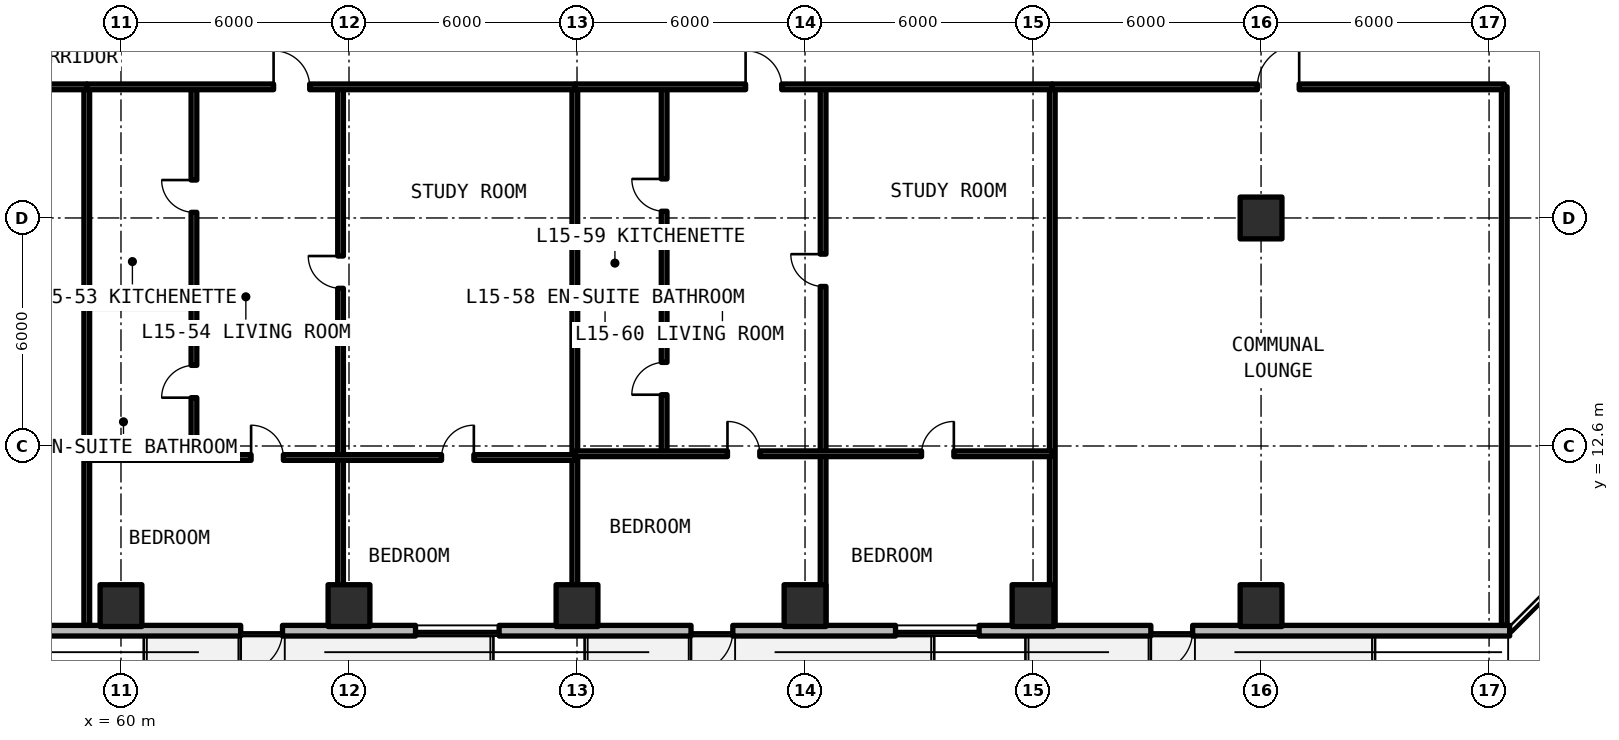
"""IFC4 building model, lengths in metres.
Left out: names, types, materials, properties, quantities, classifications, styles, units other than length and angle.
Written with IfcOpenShell. Run it as: python <this file> out.ifc"""

import sys

from ifc_helpers import new_model, si_unit, direction, frame, frame_2d, origin, origin_2d, place, context, subcontext, project, spatial, rectangle, extrude, element, fill, save


model = new_model("IFC4")
c1 = context("Model", 3, precision=1e-05, world=origin(), true_north=direction((0.0, 1.0)))
c2 = subcontext(c1, "Body", "Model", "MODEL_VIEW")
j1 = project(units=[si_unit("LENGTHUNIT", "METRE"), si_unit("PLANEANGLEUNIT", "RADIAN")], contexts=[c1])
p1 = place(None, origin())
s1 = spatial("IfcSite", under=j1, at=p1, CompositionType="ELEMENT")
p2 = place(p1, origin())
s2 = spatial("IfcBuilding", under=s1, at=p2, CompositionType="ELEMENT")
p3 = place(p2, frame((0.0, 0.0, 55.44)))
s3 = spatial("IfcBuildingStorey", under=s2, at=p3, CompositionType="ELEMENT", Elevation=55.44)
for number, where, z_axis, x_axis in (
    (1, (90.0, 18.6, 0.0), (0.0, 0.0, 1.0), (1.0, 0.0, 0.0)),
    (2, (60.0, 8.4, 0.0), (0.0, 0.0, 1.0), (1.0, 0.0, 0.0)),
    (3, (66.0, 8.4, 0.0), (0.0, 0.0, 1.0), (1.0, 0.0, 0.0)),
    (4, (72.0, 8.4, 0.0), (0.0, 0.0, 1.0), (1.0, 0.0, 0.0)),
    (5, (78.0, 8.4, 0.0), (0.0, 0.0, 1.0), (1.0, 0.0, 0.0)),
    (6, (84.0, 8.4, 0.0), (0.0, 0.0, 1.0), (1.0, 0.0, 0.0)),
    (7, (90.0, 8.4, 0.0), (0.0, 0.0, 1.0), (1.0, 0.0, 0.0)),
):
    element("IfcColumn", number, at=place(p3, frame(where, z_axis=z_axis, x_axis=x_axis)), inside=s3, PredefinedType="COLUMN", context=c2, shape_type="SweptSolid", body=[
        extrude(rectangle(XDim=1.1, YDim=1.1, at=origin_2d()), origin(), (0.0, 0.0, 1.0), 3.3),
    ])
p4 = place(p3, frame((52.14, 7.74, 0.0), z_axis=(0.0, 0.0, 1.0), x_axis=(1.0, 0.0, 0.0)))
e8 = element("IfcWall", 8, at=p4, inside=s3, PredefinedType="SOLIDWALL", context=c2, shape_type="SweptSolid", body=[
    extrude(rectangle(XDim=44.402, YDim=0.28, at=frame_2d((22.201, 0.0))), origin(), (0.0, 0.0, 1.0), 3.08),
])
p5 = place(p4, frame((11.01, 0.0, 0.0)))
e9 = element("IfcOpeningElement", 9, at=p5, cuts=e8, PredefinedType="OPENING", context=c2, shape_type="SweptSolid", body=[
    extrude(rectangle(XDim=1.1, YDim=2.15, at=frame_2d((0.55, 1.075))), frame((0.0, 0.15, 0.0), z_axis=(0.0, -1.0, 0.0), x_axis=(1.0, 0.0, 0.0)), (0.0, 0.0, 1.0), 0.3),
])
p6 = place(p4, frame((22.86, 0.0, 0.0)))
e10 = element("IfcOpeningElement", 10, at=p6, cuts=e8, PredefinedType="OPENING", context=c2, shape_type="SweptSolid", body=[
    extrude(rectangle(XDim=1.1, YDim=2.15, at=frame_2d((0.55, 1.075))), frame((0.0, 0.15, 0.0), z_axis=(0.0, -1.0, 0.0), x_axis=(1.0, 0.0, 0.0)), (0.0, 0.0, 1.0), 0.3),
])
p7 = place(p4, frame((34.96, 0.0, 0.0)))
e11 = element("IfcOpeningElement", 11, at=p7, cuts=e8, PredefinedType="OPENING", context=c2, shape_type="SweptSolid", body=[
    extrude(rectangle(XDim=1.1, YDim=2.15, at=frame_2d((0.55, 1.075))), frame((0.0, 0.15, 0.0), z_axis=(0.0, -1.0, 0.0), x_axis=(1.0, 0.0, 0.0)), (0.0, 0.0, 1.0), 0.3),
])
p8 = place(p4, frame((2.69, 0.0, 0.78)))
e12 = element("IfcOpeningElement", 12, at=p8, cuts=e8, PredefinedType="OPENING", context=c2, shape_type="SweptSolid", body=[
    extrude(rectangle(XDim=2.2, YDim=1.66, at=frame_2d((1.1, 0.83))), frame((0.0, 0.15, 0.0), z_axis=(0.0, -1.0, 0.0), x_axis=(1.0, 0.0, 0.0)), (0.0, 0.0, 1.0), 0.3),
])
p9 = place(p4, frame((15.61, 0.0, 0.78)))
e13 = element("IfcOpeningElement", 13, at=p9, cuts=e8, PredefinedType="OPENING", context=c2, shape_type="SweptSolid", body=[
    extrude(rectangle(XDim=2.2, YDim=1.66, at=frame_2d((1.1, 0.83))), frame((0.0, 0.15, 0.0), z_axis=(0.0, -1.0, 0.0), x_axis=(1.0, 0.0, 0.0)), (0.0, 0.0, 1.0), 0.3),
])
p10 = place(p4, frame((28.241, 0.0, 0.78)))
e14 = element("IfcOpeningElement", 14, at=p10, cuts=e8, PredefinedType="OPENING", context=c2, shape_type="SweptSolid", body=[
    extrude(rectangle(XDim=2.2, YDim=1.66, at=frame_2d((1.1, 0.83))), frame((0.0, 0.15, 0.0), z_axis=(0.0, -1.0, 0.0), x_axis=(1.0, 0.0, 0.0)), (0.0, 0.0, 1.0), 0.3),
])
for number, where, z_axis, x_axis in (
    (15, (96.4, 7.88, 0.0), (0.0, 0.0, 1.0), (0.0, 1.0, 0.0)),
    (16, (59.1, 7.88, 0.0), (0.0, 0.0, 1.0), (0.0, 1.0, 0.0)),
):
    element("IfcWall", number, at=place(p3, frame(where, z_axis=z_axis, x_axis=x_axis)), inside=s3, PredefinedType="SOLIDWALL", context=c2, shape_type="SweptSolid", body=[
        extrude(rectangle(XDim=14.17, YDim=0.15, at=frame_2d((7.085, 0.0))), origin(), (0.0, 0.0, 1.0), 2.35),
    ])
p11 = place(p3, frame((52.12, 22.05, 0.0), z_axis=(0.0, 0.0, 1.0), x_axis=(1.0, 0.0, 0.0)))
e17 = element("IfcWall", 17, at=p11, inside=s3, PredefinedType="SOLIDWALL", context=c2, shape_type="SweptSolid", body=[
    extrude(rectangle(XDim=6.98, YDim=0.15, at=frame_2d((3.49, 0.0))), origin(), (0.0, 0.0, 1.0), 2.35),
])
p12 = place(p11, frame((3.015, 0.0, 0.0)))
e18 = element("IfcOpeningElement", 18, at=p12, cuts=e17, PredefinedType="OPENING", context=c2, shape_type="SweptSolid", body=[
    extrude(rectangle(XDim=0.95, YDim=2.15, at=frame_2d((0.475, 1.075))), frame((0.0, 0.085, 0.0), z_axis=(0.0, -1.0, 0.0), x_axis=(1.0, 0.0, 0.0)), (0.0, 0.0, 1.0), 0.17),
])
p13 = place(p3, frame((71.943, 7.88, 0.0), z_axis=(0.0, 0.0, 1.0), x_axis=(0.0, 1.0, 0.0)))
e19 = element("IfcWall", 19, at=p13, inside=s3, PredefinedType="SOLIDWALL", context=c2, shape_type="SweptSolid", body=[
    extrude(rectangle(XDim=14.17, YDim=0.15, at=frame_2d((7.085, 0.0))), origin(), (0.0, 0.0, 1.0), 2.35),
])
p14 = place(p3, frame((65.778, 12.297, 0.0), z_axis=(0.0, 0.0, 1.0), x_axis=(0.0, 1.0, 0.0)))
e20 = element("IfcWall", 20, at=p14, inside=s3, PredefinedType="PARTITIONING", context=c2, shape_type="SweptSolid", body=[
    extrude(rectangle(XDim=9.753, YDim=0.15, at=frame_2d((4.876, 0.0))), origin(), (0.0, 0.0, 1.0), 2.35),
])
p15 = place(p14, frame((4.451, 0.0, 0.0)))
e21 = element("IfcOpeningElement", 21, at=p15, cuts=e20, PredefinedType="OPENING", context=c2, shape_type="SweptSolid", body=[
    extrude(rectangle(XDim=0.85, YDim=2.1, at=frame_2d((0.425, 1.05))), frame((0.0, 0.085, 0.0), z_axis=(0.0, -1.0, 0.0), x_axis=(1.0, 0.0, 0.0)), (0.0, 0.0, 1.0), 0.17),
])
p16 = place(p3, frame((59.1, 16.296, 0.0), z_axis=(0.0, 0.0, 1.0), x_axis=(1.0, 0.0, 0.0)))
e22 = element("IfcWall", 22, at=p16, inside=s3, PredefinedType="PARTITIONING", context=c2, shape_type="SweptSolid", body=[
    extrude(rectangle(XDim=2.82, YDim=0.15, at=frame_2d((1.41, 0.0))), origin(), (0.0, 0.0, 1.0), 2.35),
])
p17 = place(p3, frame((61.92, 12.297, 0.0), z_axis=(0.0, 0.0, 1.0), x_axis=(0.0, 1.0, 0.0)))
e23 = element("IfcWall", 23, at=p17, inside=s3, PredefinedType="PARTITIONING", context=c2, shape_type="SweptSolid", body=[
    extrude(rectangle(XDim=9.753, YDim=0.15, at=frame_2d((4.876, 0.0))), origin(), (0.0, 0.0, 1.0), 2.35),
])
p18 = place(p17, frame((1.574, 0.0, 0.0)))
e24 = element("IfcOpeningElement", 24, at=p18, cuts=e23, PredefinedType="OPENING", context=c2, shape_type="SweptSolid", body=[
    extrude(rectangle(XDim=0.85, YDim=2.1, at=frame_2d((0.425, 1.05))), frame((0.0, 0.085, 0.0), z_axis=(0.0, -1.0, 0.0), x_axis=(1.0, 0.0, 0.0)), (0.0, 0.0, 1.0), 0.17),
])
p19 = place(p17, frame((6.451, 0.0, 0.0)))
e25 = element("IfcOpeningElement", 25, at=p19, cuts=e23, PredefinedType="OPENING", context=c2, shape_type="SweptSolid", body=[
    extrude(rectangle(XDim=0.85, YDim=2.1, at=frame_2d((0.425, 1.05))), frame((0.0, 0.085, 0.0), z_axis=(0.0, -1.0, 0.0), x_axis=(1.0, 0.0, 0.0)), (0.0, 0.0, 1.0), 0.17),
])
p20 = place(p3, frame((65.778, 7.88, 0.0), z_axis=(0.0, 0.0, 1.0), x_axis=(0.0, 1.0, 0.0)))
e26 = element("IfcWall", 26, at=p20, inside=s3, PredefinedType="PARTITIONING", context=c2, shape_type="SweptSolid", body=[
    extrude(rectangle(XDim=4.417, YDim=0.15, at=frame_2d((2.209, 0.0))), origin(), (0.0, 0.0, 1.0), 2.35),
])
p21 = place(p3, frame((59.1, 12.297, 0.0), z_axis=(0.0, 0.0, 1.0), x_axis=(1.0, 0.0, 0.0)))
e27 = element("IfcWall", 27, at=p21, inside=s3, PredefinedType="PARTITIONING", context=c2, shape_type="SweptSolid", body=[
    extrude(rectangle(XDim=12.843, YDim=0.15, at=frame_2d((6.421, 0.0))), origin(), (0.0, 0.0, 1.0), 2.35),
])
p22 = place(p21, frame((4.324, 0.0, 0.0)))
e28 = element("IfcOpeningElement", 28, at=p22, cuts=e27, PredefinedType="OPENING", context=c2, shape_type="SweptSolid", body=[
    extrude(rectangle(XDim=0.85, YDim=2.1, at=frame_2d((0.425, 1.05))), frame((0.0, 0.085, 0.0), z_axis=(0.0, -1.0, 0.0), x_axis=(1.0, 0.0, 0.0)), (0.0, 0.0, 1.0), 0.17),
])
p23 = place(p21, frame((9.336, 0.0, 0.0)))
e29 = element("IfcOpeningElement", 29, at=p23, cuts=e27, PredefinedType="OPENING", context=c2, shape_type="SweptSolid", body=[
    extrude(rectangle(XDim=0.85, YDim=2.1, at=frame_2d((0.425, 1.05))), frame((0.0, 0.085, 0.0), z_axis=(0.0, -1.0, 0.0), x_axis=(1.0, 0.0, 0.0)), (0.0, 0.0, 1.0), 0.17),
])
p24 = place(p3, frame((59.1, 22.05, 0.0), z_axis=(0.0, 0.0, 1.0), x_axis=(1.0, 0.0, 0.0)))
e30 = element("IfcWall", 30, at=p24, inside=s3, PredefinedType="SOLIDWALL", context=c2, shape_type="SweptSolid", body=[
    extrude(rectangle(XDim=12.843, YDim=0.15, at=frame_2d((6.421, 0.0))), origin(), (0.0, 0.0, 1.0), 2.35),
])
p25 = place(p24, frame((4.916, 0.0, 0.0)))
e31 = element("IfcOpeningElement", 31, at=p25, cuts=e30, PredefinedType="OPENING", context=c2, shape_type="SweptSolid", body=[
    extrude(rectangle(XDim=0.95, YDim=2.15, at=frame_2d((0.475, 1.075))), frame((0.0, 0.085, 0.0), z_axis=(0.0, -1.0, 0.0), x_axis=(1.0, 0.0, 0.0)), (0.0, 0.0, 1.0), 0.17),
])
p26 = place(p3, frame((84.506, 7.88, 0.0), z_axis=(0.0, 0.0, 1.0), x_axis=(0.0, 1.0, 0.0)))
e32 = element("IfcWall", 32, at=p26, inside=s3, PredefinedType="SOLIDWALL", context=c2, shape_type="SweptSolid", body=[
    extrude(rectangle(XDim=14.17, YDim=0.15, at=frame_2d((7.085, 0.0))), origin(), (0.0, 0.0, 1.0), 2.35),
])
p27 = place(p3, frame((78.476, 12.396, 0.0), z_axis=(0.0, 0.0, 1.0), x_axis=(0.0, 1.0, 0.0)))
e33 = element("IfcWall", 33, at=p27, inside=s3, PredefinedType="PARTITIONING", context=c2, shape_type="SweptSolid", body=[
    extrude(rectangle(XDim=9.655, YDim=0.15, at=frame_2d((4.827, 0.0))), origin(), (0.0, 0.0, 1.0), 2.35),
])
p28 = place(p27, frame((4.402, 0.0, 0.0)))
e34 = element("IfcOpeningElement", 34, at=p28, cuts=e33, PredefinedType="OPENING", context=c2, shape_type="SweptSolid", body=[
    extrude(rectangle(XDim=0.85, YDim=2.1, at=frame_2d((0.425, 1.05))), frame((0.0, 0.085, 0.0), z_axis=(0.0, -1.0, 0.0), x_axis=(1.0, 0.0, 0.0)), (0.0, 0.0, 1.0), 0.17),
])
p29 = place(p3, frame((71.943, 16.354, 0.0), z_axis=(0.0, 0.0, 1.0), x_axis=(1.0, 0.0, 0.0)))
e35 = element("IfcWall", 35, at=p29, inside=s3, PredefinedType="PARTITIONING", context=c2, shape_type="SweptSolid", body=[
    extrude(rectangle(XDim=2.35, YDim=0.15, at=frame_2d((1.175, 0.0))), origin(), (0.0, 0.0, 1.0), 2.35),
])
p30 = place(p3, frame((74.293, 12.396, 0.0), z_axis=(0.0, 0.0, 1.0), x_axis=(0.0, 1.0, 0.0)))
e36 = element("IfcWall", 36, at=p30, inside=s3, PredefinedType="PARTITIONING", context=c2, shape_type="SweptSolid", body=[
    extrude(rectangle(XDim=9.655, YDim=0.15, at=frame_2d((4.827, 0.0))), origin(), (0.0, 0.0, 1.0), 2.35),
])
p31 = place(p30, frame((1.554, 0.0, 0.0)))
e37 = element("IfcOpeningElement", 37, at=p31, cuts=e36, PredefinedType="OPENING", context=c2, shape_type="SweptSolid", body=[
    extrude(rectangle(XDim=0.85, YDim=2.1, at=frame_2d((0.425, 1.05))), frame((0.0, 0.085, 0.0), z_axis=(0.0, -1.0, 0.0), x_axis=(1.0, 0.0, 0.0)), (0.0, 0.0, 1.0), 0.17),
])
p32 = place(p30, frame((6.381, 0.0, 0.0)))
e38 = element("IfcOpeningElement", 38, at=p32, cuts=e36, PredefinedType="OPENING", context=c2, shape_type="SweptSolid", body=[
    extrude(rectangle(XDim=0.85, YDim=2.1, at=frame_2d((0.425, 1.05))), frame((0.0, 0.085, 0.0), z_axis=(0.0, -1.0, 0.0), x_axis=(1.0, 0.0, 0.0)), (0.0, 0.0, 1.0), 0.17),
])
p33 = place(p3, frame((78.476, 7.88, 0.0), z_axis=(0.0, 0.0, 1.0), x_axis=(0.0, 1.0, 0.0)))
e39 = element("IfcWall", 39, at=p33, inside=s3, PredefinedType="PARTITIONING", context=c2, shape_type="SweptSolid", body=[
    extrude(rectangle(XDim=4.516, YDim=0.15, at=frame_2d((2.258, 0.0))), origin(), (0.0, 0.0, 1.0), 2.35),
])
p34 = place(p3, frame((71.943, 12.396, 0.0), z_axis=(0.0, 0.0, 1.0), x_axis=(1.0, 0.0, 0.0)))
e40 = element("IfcWall", 40, at=p34, inside=s3, PredefinedType="PARTITIONING", context=c2, shape_type="SweptSolid", body=[
    extrude(rectangle(XDim=12.564, YDim=0.15, at=frame_2d((6.282, 0.0))), origin(), (0.0, 0.0, 1.0), 2.35),
])
p35 = place(p34, frame((4.017, 0.0, 0.0)))
e41 = element("IfcOpeningElement", 41, at=p35, cuts=e40, PredefinedType="OPENING", context=c2, shape_type="SweptSolid", body=[
    extrude(rectangle(XDim=0.85, YDim=2.1, at=frame_2d((0.425, 1.05))), frame((0.0, 0.085, 0.0), z_axis=(0.0, -1.0, 0.0), x_axis=(1.0, 0.0, 0.0)), (0.0, 0.0, 1.0), 0.17),
])
p36 = place(p34, frame((9.123, 0.0, 0.0)))
e42 = element("IfcOpeningElement", 42, at=p36, cuts=e40, PredefinedType="OPENING", context=c2, shape_type="SweptSolid", body=[
    extrude(rectangle(XDim=0.85, YDim=2.1, at=frame_2d((0.425, 1.05))), frame((0.0, 0.085, 0.0), z_axis=(0.0, -1.0, 0.0), x_axis=(1.0, 0.0, 0.0)), (0.0, 0.0, 1.0), 0.17),
])
p37 = place(p3, frame((71.943, 22.05, 0.0), z_axis=(0.0, 0.0, 1.0), x_axis=(1.0, 0.0, 0.0)))
e43 = element("IfcWall", 43, at=p37, inside=s3, PredefinedType="SOLIDWALL", context=c2, shape_type="SweptSolid", body=[
    extrude(rectangle(XDim=12.564, YDim=0.15, at=frame_2d((6.282, 0.0))), origin(), (0.0, 0.0, 1.0), 2.35),
])
p38 = place(p37, frame((4.493, 0.0, 0.0)))
e44 = element("IfcOpeningElement", 44, at=p38, cuts=e43, PredefinedType="OPENING", context=c2, shape_type="SweptSolid", body=[
    extrude(rectangle(XDim=0.95, YDim=2.15, at=frame_2d((0.475, 1.075))), frame((0.0, 0.085, 0.0), z_axis=(0.0, -1.0, 0.0), x_axis=(1.0, 0.0, 0.0)), (0.0, 0.0, 1.0), 0.17),
])
p39 = place(p3, frame((84.506, 22.05, 0.0), z_axis=(0.0, 0.0, 1.0), x_axis=(1.0, 0.0, 0.0)))
e45 = element("IfcWall", 45, at=p39, inside=s3, PredefinedType="SOLIDWALL", context=c2, shape_type="SweptSolid", body=[
    extrude(rectangle(XDim=11.894, YDim=0.15, at=frame_2d((5.947, 0.0))), origin(), (0.0, 0.0, 1.0), 2.35),
])
p40 = place(p39, frame((5.397, 0.0, 0.0)))
e46 = element("IfcOpeningElement", 46, at=p40, cuts=e45, PredefinedType="OPENING", context=c2, shape_type="SweptSolid", body=[
    extrude(rectangle(XDim=1.1, YDim=2.15, at=frame_2d((0.55, 1.075))), frame((0.0, 0.085, 0.0), z_axis=(0.0, -1.0, 0.0), x_axis=(1.0, 0.0, 0.0)), (0.0, 0.0, 1.0), 0.17),
])
p41 = place(p5, frame((1.1, 0.0, 0.0), z_axis=(0.0, 0.0, 1.0), x_axis=(-1.0, 0.0, 0.0)))
e47 = element("IfcDoor", 47, at=p41, inside=s3, OperationType="SINGLE_SWING_LEFT", PredefinedType="DOOR", context=c2, shape_type="SweptSolid", body=[
    extrude(rectangle(XDim=1.1, YDim=2.15, at=frame_2d((0.55, 1.075))), frame((0.0, 0.025, 0.0), z_axis=(0.0, -1.0, 0.0), x_axis=(1.0, 0.0, 0.0)), (0.0, 0.0, 1.0), 0.05),
])
fill(e9, e47)
p42 = place(p6, frame((1.1, 0.0, 0.0), z_axis=(0.0, 0.0, 1.0), x_axis=(-1.0, 0.0, 0.0)))
e48 = element("IfcDoor", 48, at=p42, inside=s3, OperationType="SINGLE_SWING_RIGHT", PredefinedType="DOOR", context=c2, shape_type="SweptSolid", body=[
    extrude(rectangle(XDim=1.1, YDim=2.15, at=frame_2d((0.55, 1.075))), frame((0.0, 0.025, 0.0), z_axis=(0.0, -1.0, 0.0), x_axis=(1.0, 0.0, 0.0)), (0.0, 0.0, 1.0), 0.05),
])
fill(e10, e48)
p43 = place(p7, frame((1.1, 0.0, 0.0), z_axis=(0.0, 0.0, 1.0), x_axis=(-1.0, 0.0, 0.0)))
e49 = element("IfcDoor", 49, at=p43, inside=s3, OperationType="SINGLE_SWING_LEFT", PredefinedType="DOOR", context=c2, shape_type="SweptSolid", body=[
    extrude(rectangle(XDim=1.1, YDim=2.15, at=frame_2d((0.55, 1.075))), frame((0.0, 0.025, 0.0), z_axis=(0.0, -1.0, 0.0), x_axis=(1.0, 0.0, 0.0)), (0.0, 0.0, 1.0), 0.05),
])
fill(e11, e49)
p44 = place(p9, origin())
e50 = element("IfcWindow", 50, at=p44, inside=s3, PartitioningType="SINGLE_PANEL", PredefinedType="WINDOW", context=c2, shape_type="SweptSolid", body=[
    extrude(rectangle(XDim=2.2, YDim=1.66, at=frame_2d((1.1, 0.83))), frame((0.0, 0.03, 0.0), z_axis=(0.0, -1.0, 0.0), x_axis=(1.0, 0.0, 0.0)), (0.0, 0.0, 1.0), 0.06),
])
fill(e13, e50)
p45 = place(p10, origin())
e51 = element("IfcWindow", 51, at=p45, inside=s3, PartitioningType="SINGLE_PANEL", PredefinedType="WINDOW", context=c2, shape_type="SweptSolid", body=[
    extrude(rectangle(XDim=2.2, YDim=1.66, at=frame_2d((1.1, 0.83))), frame((0.0, 0.03, 0.0), z_axis=(0.0, -1.0, 0.0), x_axis=(1.0, 0.0, 0.0)), (0.0, 0.0, 1.0), 0.06),
])
fill(e14, e51)
p46 = place(p15, origin())
e52 = element("IfcDoor", 52, at=p46, inside=s3, OperationType="SINGLE_SWING_RIGHT", PredefinedType="DOOR", context=c2, shape_type="SweptSolid", body=[
    extrude(rectangle(XDim=0.85, YDim=2.1, at=frame_2d((0.425, 1.05))), frame((0.0, 0.025, 0.0), z_axis=(0.0, -1.0, 0.0), x_axis=(1.0, 0.0, 0.0)), (0.0, 0.0, 1.0), 0.05),
])
fill(e21, e52)
p47 = place(p18, origin())
e53 = element("IfcDoor", 53, at=p47, inside=s3, OperationType="SINGLE_SWING_LEFT", PredefinedType="DOOR", context=c2, shape_type="SweptSolid", body=[
    extrude(rectangle(XDim=0.85, YDim=2.1, at=frame_2d((0.425, 1.05))), frame((0.0, 0.025, 0.0), z_axis=(0.0, -1.0, 0.0), x_axis=(1.0, 0.0, 0.0)), (0.0, 0.0, 1.0), 0.05),
])
fill(e24, e53)
p48 = place(p19, origin())
e54 = element("IfcDoor", 54, at=p48, inside=s3, OperationType="SINGLE_SWING_RIGHT", PredefinedType="DOOR", context=c2, shape_type="SweptSolid", body=[
    extrude(rectangle(XDim=0.85, YDim=2.1, at=frame_2d((0.425, 1.05))), frame((0.0, 0.025, 0.0), z_axis=(0.0, -1.0, 0.0), x_axis=(1.0, 0.0, 0.0)), (0.0, 0.0, 1.0), 0.05),
])
fill(e25, e54)
p49 = place(p22, origin())
e55 = element("IfcDoor", 55, at=p49, inside=s3, OperationType="SINGLE_SWING_LEFT", PredefinedType="DOOR", context=c2, shape_type="SweptSolid", body=[
    extrude(rectangle(XDim=0.85, YDim=2.1, at=frame_2d((0.425, 1.05))), frame((0.0, 0.025, 0.0), z_axis=(0.0, -1.0, 0.0), x_axis=(1.0, 0.0, 0.0)), (0.0, 0.0, 1.0), 0.05),
])
fill(e28, e55)
p50 = place(p23, origin())
e56 = element("IfcDoor", 56, at=p50, inside=s3, OperationType="SINGLE_SWING_RIGHT", PredefinedType="DOOR", context=c2, shape_type="SweptSolid", body=[
    extrude(rectangle(XDim=0.85, YDim=2.1, at=frame_2d((0.425, 1.05))), frame((0.0, 0.025, 0.0), z_axis=(0.0, -1.0, 0.0), x_axis=(1.0, 0.0, 0.0)), (0.0, 0.0, 1.0), 0.05),
])
fill(e29, e56)
p51 = place(p25, origin())
e57 = element("IfcDoor", 57, at=p51, inside=s3, OperationType="SINGLE_SWING_LEFT", PredefinedType="DOOR", context=c2, shape_type="SweptSolid", body=[
    extrude(rectangle(XDim=0.95, YDim=2.15, at=frame_2d((0.475, 1.075))), frame((0.0, 0.025, 0.0), z_axis=(0.0, -1.0, 0.0), x_axis=(1.0, 0.0, 0.0)), (0.0, 0.0, 1.0), 0.05),
])
fill(e31, e57)
p52 = place(p28, origin())
e58 = element("IfcDoor", 58, at=p52, inside=s3, OperationType="SINGLE_SWING_RIGHT", PredefinedType="DOOR", context=c2, shape_type="SweptSolid", body=[
    extrude(rectangle(XDim=0.85, YDim=2.1, at=frame_2d((0.425, 1.05))), frame((0.0, 0.025, 0.0), z_axis=(0.0, -1.0, 0.0), x_axis=(1.0, 0.0, 0.0)), (0.0, 0.0, 1.0), 0.05),
])
fill(e34, e58)
p53 = place(p31, origin())
e59 = element("IfcDoor", 59, at=p53, inside=s3, OperationType="SINGLE_SWING_LEFT", PredefinedType="DOOR", context=c2, shape_type="SweptSolid", body=[
    extrude(rectangle(XDim=0.85, YDim=2.1, at=frame_2d((0.425, 1.05))), frame((0.0, 0.025, 0.0), z_axis=(0.0, -1.0, 0.0), x_axis=(1.0, 0.0, 0.0)), (0.0, 0.0, 1.0), 0.05),
])
fill(e37, e59)
p54 = place(p32, origin())
e60 = element("IfcDoor", 60, at=p54, inside=s3, OperationType="SINGLE_SWING_RIGHT", PredefinedType="DOOR", context=c2, shape_type="SweptSolid", body=[
    extrude(rectangle(XDim=0.85, YDim=2.1, at=frame_2d((0.425, 1.05))), frame((0.0, 0.025, 0.0), z_axis=(0.0, -1.0, 0.0), x_axis=(1.0, 0.0, 0.0)), (0.0, 0.0, 1.0), 0.05),
])
fill(e38, e60)
p55 = place(p35, origin())
e61 = element("IfcDoor", 61, at=p55, inside=s3, OperationType="SINGLE_SWING_LEFT", PredefinedType="DOOR", context=c2, shape_type="SweptSolid", body=[
    extrude(rectangle(XDim=0.85, YDim=2.1, at=frame_2d((0.425, 1.05))), frame((0.0, 0.025, 0.0), z_axis=(0.0, -1.0, 0.0), x_axis=(1.0, 0.0, 0.0)), (0.0, 0.0, 1.0), 0.05),
])
fill(e41, e61)
p56 = place(p36, origin())
e62 = element("IfcDoor", 62, at=p56, inside=s3, OperationType="SINGLE_SWING_RIGHT", PredefinedType="DOOR", context=c2, shape_type="SweptSolid", body=[
    extrude(rectangle(XDim=0.85, YDim=2.1, at=frame_2d((0.425, 1.05))), frame((0.0, 0.025, 0.0), z_axis=(0.0, -1.0, 0.0), x_axis=(1.0, 0.0, 0.0)), (0.0, 0.0, 1.0), 0.05),
])
fill(e42, e62)
p57 = place(p38, origin())
e63 = element("IfcDoor", 63, at=p57, inside=s3, OperationType="SINGLE_SWING_LEFT", PredefinedType="DOOR", context=c2, shape_type="SweptSolid", body=[
    extrude(rectangle(XDim=0.95, YDim=2.15, at=frame_2d((0.475, 1.075))), frame((0.0, 0.025, 0.0), z_axis=(0.0, -1.0, 0.0), x_axis=(1.0, 0.0, 0.0)), (0.0, 0.0, 1.0), 0.05),
])
fill(e44, e63)
p58 = place(p40, origin())
e64 = element("IfcDoor", 64, at=p58, inside=s3, OperationType="SINGLE_SWING_RIGHT", PredefinedType="DOOR", context=c2, shape_type="SweptSolid", body=[
    extrude(rectangle(XDim=1.1, YDim=2.15, at=frame_2d((0.55, 1.075))), frame((0.0, 0.025, 0.0), z_axis=(0.0, -1.0, 0.0), x_axis=(1.0, 0.0, 0.0)), (0.0, 0.0, 1.0), 0.05),
])
fill(e46, e64)
save(model, sys.argv[1])
